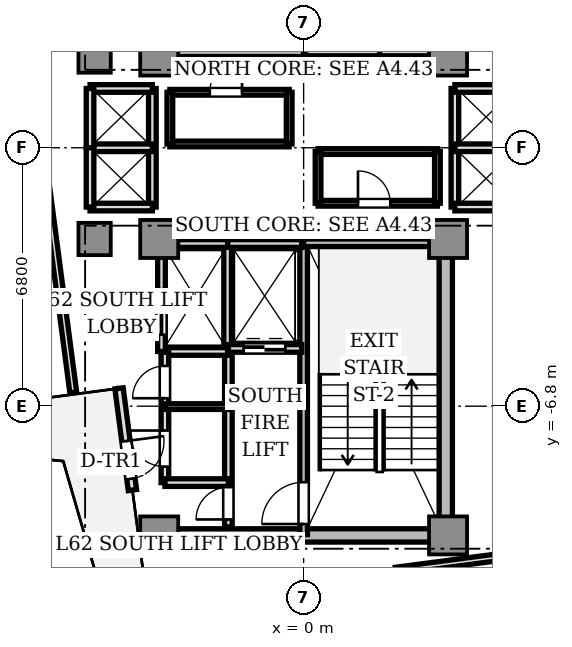
"""IFC4 building model, lengths in metres.
Left out: names, types, materials, properties, quantities, classifications, styles, units other than length and angle.
Written with IfcOpenShell. Run it as: python <this file> out.ifc"""

import sys

from ifc_helpers import new_model, si_unit, direction, frame, frame_2d, origin, origin_2d, place, context, subcontext, project, spatial, rectangle, extrude, source, transform, mapped, element, fill, save


model = new_model("IFC4")
c1 = context("Model", 3, precision=1e-05, world=origin(), true_north=direction((0.0, 1.0)))
c2 = subcontext(c1, "Body", "Model", "MODEL_VIEW")
j1 = project(units=[si_unit("LENGTHUNIT", "METRE"), si_unit("PLANEANGLEUNIT", "RADIAN")], contexts=[c1])
p1 = place(None, origin())
s1 = spatial("IfcSite", under=j1, at=p1, CompositionType="ELEMENT")
p2 = place(p1, origin())
s2 = spatial("IfcBuilding", under=s1, at=p2, CompositionType="ELEMENT")
p3 = place(p2, frame((0.0, 0.0, 223.25)))
s3 = spatial("IfcBuildingStorey", under=s2, at=p3, CompositionType="ELEMENT", Elevation=223.25)
p4 = place(p3, frame((-3.55, -10.2, 0.0), z_axis=(0.0, 0.0, 1.0), x_axis=(1.0, 0.0, 0.0)))
e1 = element("IfcWall", 1, at=p4, inside=s3, PredefinedType="SHEAR", context=c2, shape_type="SweptSolid", body=[
    extrude(rectangle(XDim=7.1, YDim=0.35, at=frame_2d((3.55, 0.0))), origin(), (0.0, 0.0, 1.0), 3.11),
])
p5 = place(p3, frame((3.74, -9.75, 0.0), z_axis=(0.0, 0.0, 1.0), x_axis=(0.0, 1.0, 0.0)))
e2 = element("IfcWall", 2, at=p5, inside=s3, PredefinedType="SHEAR", context=c2, shape_type="SweptSolid", body=[
    extrude(rectangle(XDim=6.9, YDim=0.35, at=frame_2d((3.45, 0.0))), origin(), (0.0, 0.0, 1.0), 3.11),
])
m1 = source(origin(), c2, "Body", "SweptSolid", [
    extrude(rectangle(XDim=1.0, YDim=1.0, at=origin_2d()), origin(), (0.0, 0.0, 1.0), 3.11),
])
for number, where, z_axis, x_axis in (
    (3, (-3.8, 2.4, 0.0), (0.0, 0.0, 1.0), (1.0, 0.0, 0.0)),
    (4, (3.8, 2.4, 0.0), (0.0, 0.0, 1.0), (1.0, 0.0, 0.0)),
    (5, (-3.8, -2.4, 0.0), (0.0, 0.0, 1.0), (1.0, 0.0, 0.0)),
    (6, (3.8, -2.4, 0.0), (0.0, 0.0, 1.0), (1.0, 0.0, 0.0)),
    (7, (-3.8, -10.2, 0.0), (0.0, 0.0, 1.0), (1.0, 0.0, 0.0)),
    (8, (3.8, -10.2, 0.0), (0.0, 0.0, 1.0), (1.0, 0.0, 0.0)),
):
    element("IfcColumn", number, at=place(p3, frame(where, z_axis=z_axis, x_axis=x_axis)), inside=s3, PredefinedType="COLUMN", context=c2, shape_type="MappedRepresentation", body=[
        mapped(m1, transform((0.0, 0.0, 0.0), scale=1.0)),
    ])
m2 = source(origin(), c2, "Body", "SweptSolid", [
    extrude(rectangle(XDim=0.85, YDim=0.85, at=origin_2d()), origin(), (0.0, 0.0, 1.0), 3.11),
])
for number, where, z_axis, x_axis in (
    (9, (-5.5, 2.4, 0.0), (0.0, 0.0, 1.0), (1.0, 0.0, 0.0)),
    (10, (-5.5, -2.4, 0.0), (0.0, 0.0, 1.0), (1.0, 0.0, 0.0)),
):
    element("IfcColumn", number, at=place(p3, frame(where, z_axis=z_axis, x_axis=x_axis)), inside=s3, PredefinedType="COLUMN", context=c2, shape_type="MappedRepresentation", body=[
        mapped(m2, transform((0.0, 0.0, 0.0), scale=1.0)),
    ])
p6 = place(p3, frame((-4.857, -6.33, 0.0), z_axis=(0.0, 0.0, 1.0), x_axis=(0.130564442062, -0.991439824936, 0.0)))
e11 = element("IfcWall", 11, at=p6, inside=s3, PredefinedType="STANDARD", context=c2, shape_type="SweptSolid", body=[
    extrude(rectangle(XDim=2.7, YDim=0.22, at=frame_2d((1.35, 0.0))), origin(), (0.0, 0.0, 1.0), 3.11),
])
p7 = place(p6, frame((1.4, 0.0, 0.0)))
e12 = element("IfcOpeningElement", 12, at=p7, cuts=e11, PredefinedType="OPENING", context=c2, shape_type="SweptSolid", body=[
    extrude(rectangle(XDim=1.0, YDim=2.2, at=frame_2d((0.5, 1.1))), frame((0.0, 0.12, 0.0), z_axis=(0.0, -1.0, 0.0), x_axis=(1.0, 0.0, 0.0)), (0.0, 0.0, 1.0), 0.24),
])
p8 = place(p3, frame((0.0, 2.5, 0.0), z_axis=(0.0, 0.0, 1.0), x_axis=(0.0, 1.0, 0.0)))
e13 = element("IfcWall", 13, at=p8, inside=s3, PredefinedType="SOLIDWALL", context=c2, shape_type="SweptSolid", body=[
    extrude(rectangle(XDim=7.68, YDim=0.2, at=frame_2d((3.84, 0.0))), origin(), (0.0, 0.0, 1.0), 3.11),
])
p9 = place(p8, frame((6.36, 0.0, 0.0)))
e14 = element("IfcOpeningElement", 14, at=p9, cuts=e13, PredefinedType="OPENING", context=c2, shape_type="SweptSolid", body=[
    extrude(rectangle(XDim=1.1, YDim=2.15, at=frame_2d((0.55, 1.075))), frame((0.0, 0.11, 0.0), z_axis=(0.0, -1.0, 0.0), x_axis=(1.0, 0.0, 0.0)), (0.0, 0.0, 1.0), 0.22),
])
p10 = place(p3, frame((-3.72, 2.5, 0.0), z_axis=(0.0, 0.0, 1.0), x_axis=(1.0, 0.0, 0.0)))
e15 = element("IfcWall", 15, at=p10, inside=s3, PredefinedType="SOLIDWALL", context=c2, shape_type="SweptSolid", body=[
    extrude(rectangle(XDim=3.72, YDim=0.2, at=frame_2d((1.86, 0.0))), origin(), (0.0, 0.0, 1.0), 3.11),
])
p11 = place(p3, frame((0.0, -10.18, 0.0), z_axis=(0.0, 0.0, 1.0), x_axis=(0.0, 1.0, 0.0)))
e16 = element("IfcWall", 16, at=p11, inside=s3, PredefinedType="SOLIDWALL", context=c2, shape_type="SweptSolid", body=[
    extrude(rectangle(XDim=7.68, YDim=0.2, at=frame_2d((3.84, 0.0))), origin(), (0.0, 0.0, 1.0), 3.11),
])
p12 = place(p11, frame((0.28, 0.0, 0.0)))
e17 = element("IfcOpeningElement", 17, at=p12, cuts=e16, PredefinedType="OPENING", context=c2, shape_type="SweptSolid", body=[
    extrude(rectangle(XDim=1.1, YDim=2.15, at=frame_2d((0.55, 1.075))), frame((0.0, 0.11, 0.0), z_axis=(0.0, -1.0, 0.0), x_axis=(1.0, 0.0, 0.0)), (0.0, 0.0, 1.0), 0.22),
])
p13 = place(p3, frame((0.0, -2.5, 0.0), z_axis=(0.0, 0.0, 1.0), x_axis=(1.0, 0.0, 0.0)))
e18 = element("IfcWall", 18, at=p13, inside=s3, PredefinedType="SOLIDWALL", context=c2, shape_type="SweptSolid", body=[
    extrude(rectangle(XDim=3.72, YDim=0.2, at=frame_2d((1.86, 0.0))), origin(), (0.0, 0.0, 1.0), 3.11),
])
p14 = place(p3, frame((-1.98, -9.98, 0.0), z_axis=(0.0, 0.0, 1.0), x_axis=(0.0, 1.0, 0.0)))
e19 = element("IfcWall", 19, at=p14, inside=s3, PredefinedType="SOLIDWALL", context=c2, shape_type="SweptSolid", body=[
    extrude(rectangle(XDim=4.66, YDim=0.2, at=frame_2d((2.33, 0.0))), origin(), (0.0, 0.0, 1.0), 2.66),
])
p15 = place(p14, frame((0.2, 0.0, 0.0)))
e20 = element("IfcOpeningElement", 20, at=p15, cuts=e19, PredefinedType="OPENING", context=c2, shape_type="SweptSolid", body=[
    extrude(rectangle(XDim=0.85, YDim=2.1, at=frame_2d((0.425, 1.05))), frame((0.0, 0.11, 0.0), z_axis=(0.0, -1.0, 0.0), x_axis=(1.0, 0.0, 0.0)), (0.0, 0.0, 1.0), 0.22),
])
p16 = place(p3, frame((2.0, 2.5, 0.0), z_axis=(0.0, 0.0, 1.0), x_axis=(0.0, 1.0, 0.0)))
e21 = element("IfcWall", 21, at=p16, inside=s3, PredefinedType="SOLIDWALL", context=c2, shape_type="SweptSolid", body=[
    extrude(rectangle(XDim=2.78, YDim=0.2, at=frame_2d((1.39, 0.0))), origin(), (0.0, 0.0, 1.0), 2.66),
])
p17 = place(p3, frame((0.05, 2.52, 0.0), z_axis=(0.0, 0.0, 1.0), x_axis=(1.0, 0.0, 0.0)))
e22 = element("IfcWall", 22, at=p17, inside=s3, PredefinedType="SOLIDWALL", context=c2, shape_type="SweptSolid", body=[
    extrude(rectangle(XDim=1.95, YDim=0.2, at=frame_2d((0.975, 0.0))), origin(), (0.0, 0.0, 1.0), 2.66),
])
p18 = place(p3, frame((-2.0, -5.28, 0.0), z_axis=(0.0, 0.0, 1.0), x_axis=(0.0, 1.0, 0.0)))
e23 = element("IfcWall", 23, at=p18, inside=s3, PredefinedType="SOLIDWALL", context=c2, shape_type="SweptSolid", body=[
    extrude(rectangle(XDim=2.78, YDim=0.2, at=frame_2d((1.39, 0.0))), origin(), (0.0, 0.0, 1.0), 2.66),
])
p19 = place(p3, frame((-2.0, -2.52, 0.0), z_axis=(0.0, 0.0, 1.0), x_axis=(1.0, 0.0, 0.0)))
e24 = element("IfcWall", 24, at=p19, inside=s3, PredefinedType="SOLIDWALL", context=c2, shape_type="SweptSolid", body=[
    extrude(rectangle(XDim=1.95, YDim=0.2, at=frame_2d((0.975, 0.0))), origin(), (0.0, 0.0, 1.0), 2.66),
])
p20 = place(p3, frame((-1.98, -5.28, 0.0), z_axis=(0.0, 0.0, 1.0), x_axis=(1.0, 0.0, 0.0)))
e25 = element("IfcWall", 25, at=p20, inside=s3, PredefinedType="SOLIDWALL", context=c2, shape_type="SweptSolid", body=[
    extrude(rectangle(XDim=1.93, YDim=0.2, at=frame_2d((0.965, 0.0))), origin(), (0.0, 0.0, 1.0), 2.66),
])
p21 = place(p20, frame((0.4, 0.0, 0.0)))
e26 = element("IfcOpeningElement", 26, at=p21, cuts=e25, PredefinedType="OPENING", context=c2, shape_type="SweptSolid", body=[
    extrude(rectangle(XDim=1.1, YDim=2.2, at=frame_2d((0.55, 1.1))), frame((0.0, 0.11, 0.0), z_axis=(0.0, -1.0, 0.0), x_axis=(1.0, 0.0, 0.0)), (0.0, 0.0, 1.0), 0.22),
])
for number, where, z_axis, x_axis in (
    (27, (2.0, 2.52, 0.0), (0.0, 0.0, 1.0), (1.0, 0.0, 0.0)),
    (28, (-3.32, -2.52, 0.0), (0.0, 0.0, 1.0), (1.0, 0.0, 0.0)),
):
    element("IfcWall", number, at=place(p3, frame(where, z_axis=z_axis, x_axis=x_axis)), inside=s3, PredefinedType="SOLIDWALL", context=c2, shape_type="SweptSolid", body=[
        extrude(rectangle(XDim=1.32, YDim=0.2, at=frame_2d((0.66, 0.0))), origin(), (0.0, 0.0, 1.0), 2.66),
    ])
p22 = place(p3, frame((-3.74, -5.36, 0.0), z_axis=(0.0, 0.0, 1.0), x_axis=(1.0, 0.0, 0.0)))
e29 = element("IfcWall", 29, at=p22, inside=s3, PredefinedType="SOLIDWALL", context=c2, shape_type="SweptSolid", body=[
    extrude(rectangle(XDim=1.74, YDim=0.2, at=frame_2d((0.87, 0.0))), origin(), (0.0, 0.0, 1.0), 2.66),
])
p23 = place(p3, frame((-3.74, -5.36, 0.0), z_axis=(0.0, 0.0, 1.0), x_axis=(0.0, 1.0, 0.0)))
e30 = element("IfcWall", 30, at=p23, inside=s3, PredefinedType="SOLIDWALL", context=c2, shape_type="SweptSolid", body=[
    extrude(rectangle(XDim=2.48, YDim=0.2, at=frame_2d((1.24, 0.0))), origin(), (0.0, 0.0, 1.0), 2.66),
])
p24 = place(p23, frame((0.44, 0.0, 0.0)))
e31 = element("IfcOpeningElement", 31, at=p24, cuts=e30, PredefinedType="OPENING", context=c2, shape_type="SweptSolid", body=[
    extrude(rectangle(XDim=1.2, YDim=2.2, at=frame_2d((0.6, 1.1))), frame((0.0, 0.11, 0.0), z_axis=(0.0, -1.0, 0.0), x_axis=(1.0, 0.0, 0.0)), (0.0, 0.0, 1.0), 0.22),
])
p25 = place(p3, frame((3.98, -1.56, 0.0), z_axis=(0.0, 0.0, 1.0), x_axis=(0.0, 1.0, 0.0)))
e32 = element("IfcWall", 32, at=p25, inside=s3, PredefinedType="SOLIDWALL", context=c2, shape_type="SweptSolid", body=[
    extrude(rectangle(XDim=3.12, YDim=0.2, at=frame_2d((1.56, 0.0))), origin(), (0.0, 0.0, 1.0), 2.33),
])
for number, where, z_axis, x_axis in (
    (33, (3.98, 1.56, 0.0), (0.0, 0.0, 1.0), (1.0, 0.0, 0.0)),
    (34, (3.98, -1.56, 0.0), (0.0, 0.0, 1.0), (1.0, 0.0, 0.0)),
    (35, (3.98, 0.0, 0.0), (0.0, 0.0, 1.0), (1.0, 0.0, 0.0)),
):
    element("IfcWall", number, at=place(p3, frame(where, z_axis=z_axis, x_axis=x_axis)), inside=s3, PredefinedType="SOLIDWALL", context=c2, shape_type="SweptSolid", body=[
        extrude(rectangle(XDim=1.64, YDim=0.2, at=frame_2d((0.82, 0.0))), origin(), (0.0, 0.0, 1.0), 2.66),
    ])
p26 = place(p3, frame((-3.98, -1.56, 0.0), z_axis=(0.0, 0.0, 1.0), x_axis=(0.0, 1.0, 0.0)))
e36 = element("IfcWall", 36, at=p26, inside=s3, PredefinedType="SOLIDWALL", context=c2, shape_type="SweptSolid", body=[
    extrude(rectangle(XDim=3.12, YDim=0.2, at=frame_2d((1.56, 0.0))), origin(), (0.0, 0.0, 1.0), 2.33),
])
for number, where, z_axis, x_axis in (
    (37, (-5.62, 1.56, 0.0), (0.0, 0.0, 1.0), (1.0, 0.0, 0.0)),
    (38, (-5.62, -1.56, 0.0), (0.0, 0.0, 1.0), (1.0, 0.0, 0.0)),
    (39, (-5.62, 0.0, 0.0), (0.0, 0.0, 1.0), (1.0, 0.0, 0.0)),
):
    element("IfcWall", number, at=place(p3, frame(where, z_axis=z_axis, x_axis=x_axis)), inside=s3, PredefinedType="SOLIDWALL", context=c2, shape_type="SweptSolid", body=[
        extrude(rectangle(XDim=1.64, YDim=0.2, at=frame_2d((0.82, 0.0))), origin(), (0.0, 0.0, 1.0), 2.66),
    ])
for number, where, z_axis, x_axis in (
    (40, (-5.62, 0.0, 0.0), (0.0, 0.0, 1.0), (0.0, 1.0, 0.0)),
    (41, (-5.62, -1.56, 0.0), (0.0, 0.0, 1.0), (0.0, 1.0, 0.0)),
):
    element("IfcWall", number, at=place(p3, frame(where, z_axis=z_axis, x_axis=x_axis)), inside=s3, PredefinedType="SOLIDWALL", context=c2, shape_type="SweptSolid", body=[
        extrude(rectangle(XDim=1.56, YDim=0.2, at=frame_2d((0.78, 0.0))), origin(), (0.0, 0.0, 1.0), 2.66),
    ])
p27 = place(p3, frame((-3.65, -8.81, 0.0), z_axis=(0.0, 0.0, 1.0), x_axis=(0.0, 1.0, 0.0)))
e42 = element("IfcWall", 42, at=p27, inside=s3, PredefinedType="SOLIDWALL", context=c2, shape_type="SweptSolid", body=[
    extrude(rectangle(XDim=3.43, YDim=0.2, at=frame_2d((1.715, 0.0))), origin(), (0.0, 0.0, 1.0), 2.66),
])
p28 = place(p27, frame((0.42, 0.0, 0.0)))
e43 = element("IfcOpeningElement", 43, at=p28, cuts=e42, PredefinedType="OPENING", context=c2, shape_type="SweptSolid", body=[
    extrude(rectangle(XDim=0.95, YDim=2.15, at=frame_2d((0.475, 1.075))), frame((0.0, 0.11, 0.0), z_axis=(0.0, -1.0, 0.0), x_axis=(1.0, 0.0, 0.0)), (0.0, 0.0, 1.0), 0.22),
])
p29 = place(p27, frame((2.22, 0.0, 0.0)))
e44 = element("IfcOpeningElement", 44, at=p29, cuts=e42, PredefinedType="OPENING", context=c2, shape_type="SweptSolid", body=[
    extrude(rectangle(XDim=0.85, YDim=2.1, at=frame_2d((0.425, 1.05))), frame((0.0, 0.11, 0.0), z_axis=(0.0, -1.0, 0.0), x_axis=(1.0, 0.0, 0.0)), (0.0, 0.0, 1.0), 0.22),
])
p30 = place(p3, frame((-3.65, -8.81, 0.0), z_axis=(0.0, 0.0, 1.0), x_axis=(1.0, 0.0, 0.0)))
e45 = element("IfcWall", 45, at=p30, inside=s3, PredefinedType="SOLIDWALL", context=c2, shape_type="SweptSolid", body=[
    extrude(rectangle(XDim=1.67, YDim=0.2, at=frame_2d((0.835, 0.0))), origin(), (0.0, 0.0, 1.0), 2.66),
])
p31 = place(p3, frame((-3.65, -6.81, 0.0), z_axis=(0.0, 0.0, 1.0), x_axis=(1.0, 0.0, 0.0)))
e46 = element("IfcWall", 46, at=p31, inside=s3, PredefinedType="PARTITIONING", context=c2, shape_type="SweptSolid", body=[
    extrude(rectangle(XDim=1.67, YDim=0.15, at=frame_2d((0.835, 0.0))), origin(), (0.0, 0.0, 1.0), 2.66),
])
p32 = place(p3, frame((-3.52, 0.1, 0.0), z_axis=(0.0, 0.0, 1.0), x_axis=(1.0, 0.0, 0.0)))
e47 = element("IfcWall", 47, at=p32, inside=s3, PredefinedType="PARTITIONING", context=c2, shape_type="SweptSolid", body=[
    extrude(rectangle(XDim=3.14, YDim=0.15, at=frame_2d((1.57, 0.0))), origin(), (0.0, 0.0, 1.0), 2.66),
])
p33 = place(p3, frame((-3.52, 1.46, 0.0), z_axis=(0.0, 0.0, 1.0), x_axis=(1.0, 0.0, 0.0)))
e48 = element("IfcWall", 48, at=p33, inside=s3, PredefinedType="PARTITIONING", context=c2, shape_type="SweptSolid", body=[
    extrude(rectangle(XDim=3.14, YDim=0.15, at=frame_2d((1.57, 0.0))), origin(), (0.0, 0.0, 1.0), 2.66),
])
p34 = place(p33, frame((1.05, 0.0, 0.0)))
e49 = element("IfcOpeningElement", 49, at=p34, cuts=e48, PredefinedType="OPENING", context=c2, shape_type="SweptSolid", body=[
    extrude(rectangle(XDim=0.85, YDim=2.1, at=frame_2d((0.425, 1.05))), frame((0.0, 0.085, 0.0), z_axis=(0.0, -1.0, 0.0), x_axis=(1.0, 0.0, 0.0)), (0.0, 0.0, 1.0), 0.17),
])
p35 = place(p3, frame((-3.52, 0.1, 0.0), z_axis=(0.0, 0.0, 1.0), x_axis=(0.0, 1.0, 0.0)))
e50 = element("IfcWall", 50, at=p35, inside=s3, PredefinedType="PARTITIONING", context=c2, shape_type="SweptSolid", body=[
    extrude(rectangle(XDim=1.36, YDim=0.15, at=frame_2d((0.68, 0.0))), origin(), (0.0, 0.0, 1.0), 2.33),
])
p36 = place(p3, frame((-0.38, 0.1, 0.0), z_axis=(0.0, 0.0, 1.0), x_axis=(0.0, 1.0, 0.0)))
e51 = element("IfcWall", 51, at=p36, inside=s3, PredefinedType="PARTITIONING", context=c2, shape_type="SweptSolid", body=[
    extrude(rectangle(XDim=1.36, YDim=0.15, at=frame_2d((0.68, 0.0))), origin(), (0.0, 0.0, 1.0), 2.66),
])
p37 = place(p3, frame((0.38, -0.1, 0.0), z_axis=(0.0, 0.0, 1.0), x_axis=(1.0, 0.0, 0.0)))
e52 = element("IfcWall", 52, at=p37, inside=s3, PredefinedType="PARTITIONING", context=c2, shape_type="SweptSolid", body=[
    extrude(rectangle(XDim=3.14, YDim=0.15, at=frame_2d((1.57, 0.0))), origin(), (0.0, 0.0, 1.0), 2.66),
])
p38 = place(p3, frame((0.38, -1.46, 0.0), z_axis=(0.0, 0.0, 1.0), x_axis=(1.0, 0.0, 0.0)))
e53 = element("IfcWall", 53, at=p38, inside=s3, PredefinedType="PARTITIONING", context=c2, shape_type="SweptSolid", body=[
    extrude(rectangle(XDim=3.14, YDim=0.15, at=frame_2d((1.57, 0.0))), origin(), (0.0, 0.0, 1.0), 2.66),
])
p39 = place(p38, frame((1.05, 0.0, 0.0)))
e54 = element("IfcOpeningElement", 54, at=p39, cuts=e53, PredefinedType="OPENING", context=c2, shape_type="SweptSolid", body=[
    extrude(rectangle(XDim=0.85, YDim=2.1, at=frame_2d((0.425, 1.05))), frame((0.0, 0.085, 0.0), z_axis=(0.0, -1.0, 0.0), x_axis=(1.0, 0.0, 0.0)), (0.0, 0.0, 1.0), 0.17),
])
p40 = place(p3, frame((0.38, -1.46, 0.0), z_axis=(0.0, 0.0, 1.0), x_axis=(0.0, 1.0, 0.0)))
e55 = element("IfcWall", 55, at=p40, inside=s3, PredefinedType="PARTITIONING", context=c2, shape_type="SweptSolid", body=[
    extrude(rectangle(XDim=1.36, YDim=0.15, at=frame_2d((0.68, 0.0))), origin(), (0.0, 0.0, 1.0), 2.66),
])
p41 = place(p3, frame((3.52, -1.46, 0.0), z_axis=(0.0, 0.0, 1.0), x_axis=(0.0, 1.0, 0.0)))
e56 = element("IfcWall", 56, at=p41, inside=s3, PredefinedType="PARTITIONING", context=c2, shape_type="SweptSolid", body=[
    extrude(rectangle(XDim=1.36, YDim=0.15, at=frame_2d((0.68, 0.0))), origin(), (0.0, 0.0, 1.0), 2.33),
])
p42 = place(p3, frame((-7.234, 2.469, 0.0), z_axis=(0.0, 0.0, 1.0), x_axis=(0.130520590161, -0.991445598883, 0.0)))
e57 = element("IfcWall", 57, at=p42, inside=s3, PredefinedType="PARTITIONING", context=c2, shape_type="SweptSolid", body=[
    extrude(rectangle(XDim=8.984, YDim=0.18, at=frame_2d((4.492, 0.0))), origin(), (0.0, 0.0, 1.0), 2.66),
])
p43 = place(p3, frame((2.423, -11.129, 0.0), z_axis=(0.0, 0.0, 1.0), x_axis=(0.991443372348, 0.130537501998, 0.0)))
e58 = element("IfcWall", 58, at=p43, inside=s3, PredefinedType="PARTITIONING", context=c2, shape_type="SweptSolid", body=[
    extrude(rectangle(XDim=4.642, YDim=0.18, at=frame_2d((2.321, 0.0))), origin(), (0.0, 0.0, 1.0), 2.66),
])
m3 = source(origin(), c2, "Body", "SweptSolid", [
    extrude(rectangle(XDim=1.0, YDim=0.05, at=origin_2d()), origin(), (0.0, 0.0, 1.0), 2.2),
])
p44 = place(p7, frame((0.5, 0.0, 0.0)))
e59 = element("IfcDoor", 59, at=p44, inside=s3, OperationType="SINGLE_SWING_LEFT", PredefinedType="DOOR", context=c2, shape_type="MappedRepresentation", body=[
    mapped(m3, transform((0.0, 0.0, 0.0), scale=1.0)),
])
fill(e12, e59)
m4 = source(origin(), c2, "Body", "SweptSolid", [
    extrude(rectangle(XDim=1.1, YDim=0.05, at=origin_2d()), origin(), (0.0, 0.0, 1.0), 2.15),
])
p45 = place(p12, frame((0.55, 0.0, 0.0)))
e60 = element("IfcDoor", 60, at=p45, inside=s3, OperationType="SINGLE_SWING_LEFT", PredefinedType="DOOR", context=c2, shape_type="MappedRepresentation", body=[
    mapped(m4, transform((0.0, 0.0, 0.0), scale=1.0)),
])
fill(e17, e60)
m5 = source(origin(), c2, "Body", "SweptSolid", [
    extrude(rectangle(XDim=0.85, YDim=0.05, at=origin_2d()), origin(), (0.0, 0.0, 1.0), 2.1),
])
p46 = place(p15, frame((0.425, 0.0, 0.0)))
e61 = element("IfcDoor", 61, at=p46, inside=s3, OperationType="SINGLE_SWING_LEFT", PredefinedType="DOOR", context=c2, shape_type="MappedRepresentation", body=[
    mapped(m5, transform((0.0, 0.0, 0.0), scale=1.0)),
])
fill(e20, e61)
m6 = source(origin(), c2, "Body", "SweptSolid", [
    extrude(rectangle(XDim=1.1, YDim=0.05, at=origin_2d()), origin(), (0.0, 0.0, 1.0), 2.2),
])
p47 = place(p21, frame((0.55, 0.0, 0.0)))
e62 = element("IfcDoor", 62, at=p47, inside=s3, OperationType="DOUBLE_DOOR_SLIDING", PredefinedType="DOOR", context=c2, shape_type="MappedRepresentation", body=[
    mapped(m6, transform((0.0, 0.0, 0.0), scale=1.0)),
])
fill(e26, e62)
m7 = source(origin(), c2, "Body", "SweptSolid", [
    extrude(rectangle(XDim=1.2, YDim=0.05, at=origin_2d()), origin(), (0.0, 0.0, 1.0), 2.2),
])
p48 = place(p24, frame((0.6, 0.0, 0.0)))
e63 = element("IfcDoor", 63, at=p48, inside=s3, OperationType="DOUBLE_DOOR_SLIDING", PredefinedType="DOOR", context=c2, shape_type="MappedRepresentation", body=[
    mapped(m7, transform((0.0, 0.0, 0.0), scale=1.0)),
])
fill(e31, e63)
m8 = source(origin(), c2, "Body", "SweptSolid", [
    extrude(rectangle(XDim=0.95, YDim=0.05, at=origin_2d()), origin(), (0.0, 0.0, 1.0), 2.15),
])
p49 = place(p28, frame((0.475, 0.0, 0.0)))
e64 = element("IfcDoor", 64, at=p49, inside=s3, OperationType="SINGLE_SWING_RIGHT", PredefinedType="DOOR", context=c2, shape_type="MappedRepresentation", body=[
    mapped(m8, transform((0.0, 0.0, 0.0), scale=1.0)),
])
fill(e43, e64)
p50 = place(p29, frame((0.425, 0.0, 0.0)))
e65 = element("IfcDoor", 65, at=p50, inside=s3, OperationType="SINGLE_SWING_LEFT", PredefinedType="DOOR", context=c2, shape_type="MappedRepresentation", body=[
    mapped(m5, transform((0.0, 0.0, 0.0), scale=1.0)),
])
fill(e44, e65)
p51 = place(p34, frame((0.425, 0.0, 0.0)))
e66 = element("IfcDoor", 66, at=p51, inside=s3, OperationType="SINGLE_SWING_RIGHT", PredefinedType="DOOR", context=c2, shape_type="MappedRepresentation", body=[
    mapped(m5, transform((0.0, 0.0, 0.0), scale=1.0)),
])
fill(e49, e66)
p52 = place(p39, frame((0.425, 0.0, 0.0)))
e67 = element("IfcDoor", 67, at=p52, inside=s3, OperationType="SINGLE_SWING_LEFT", PredefinedType="DOOR", context=c2, shape_type="MappedRepresentation", body=[
    mapped(m5, transform((0.0, 0.0, 0.0), scale=1.0)),
])
fill(e54, e67)
save(model, sys.argv[1])
